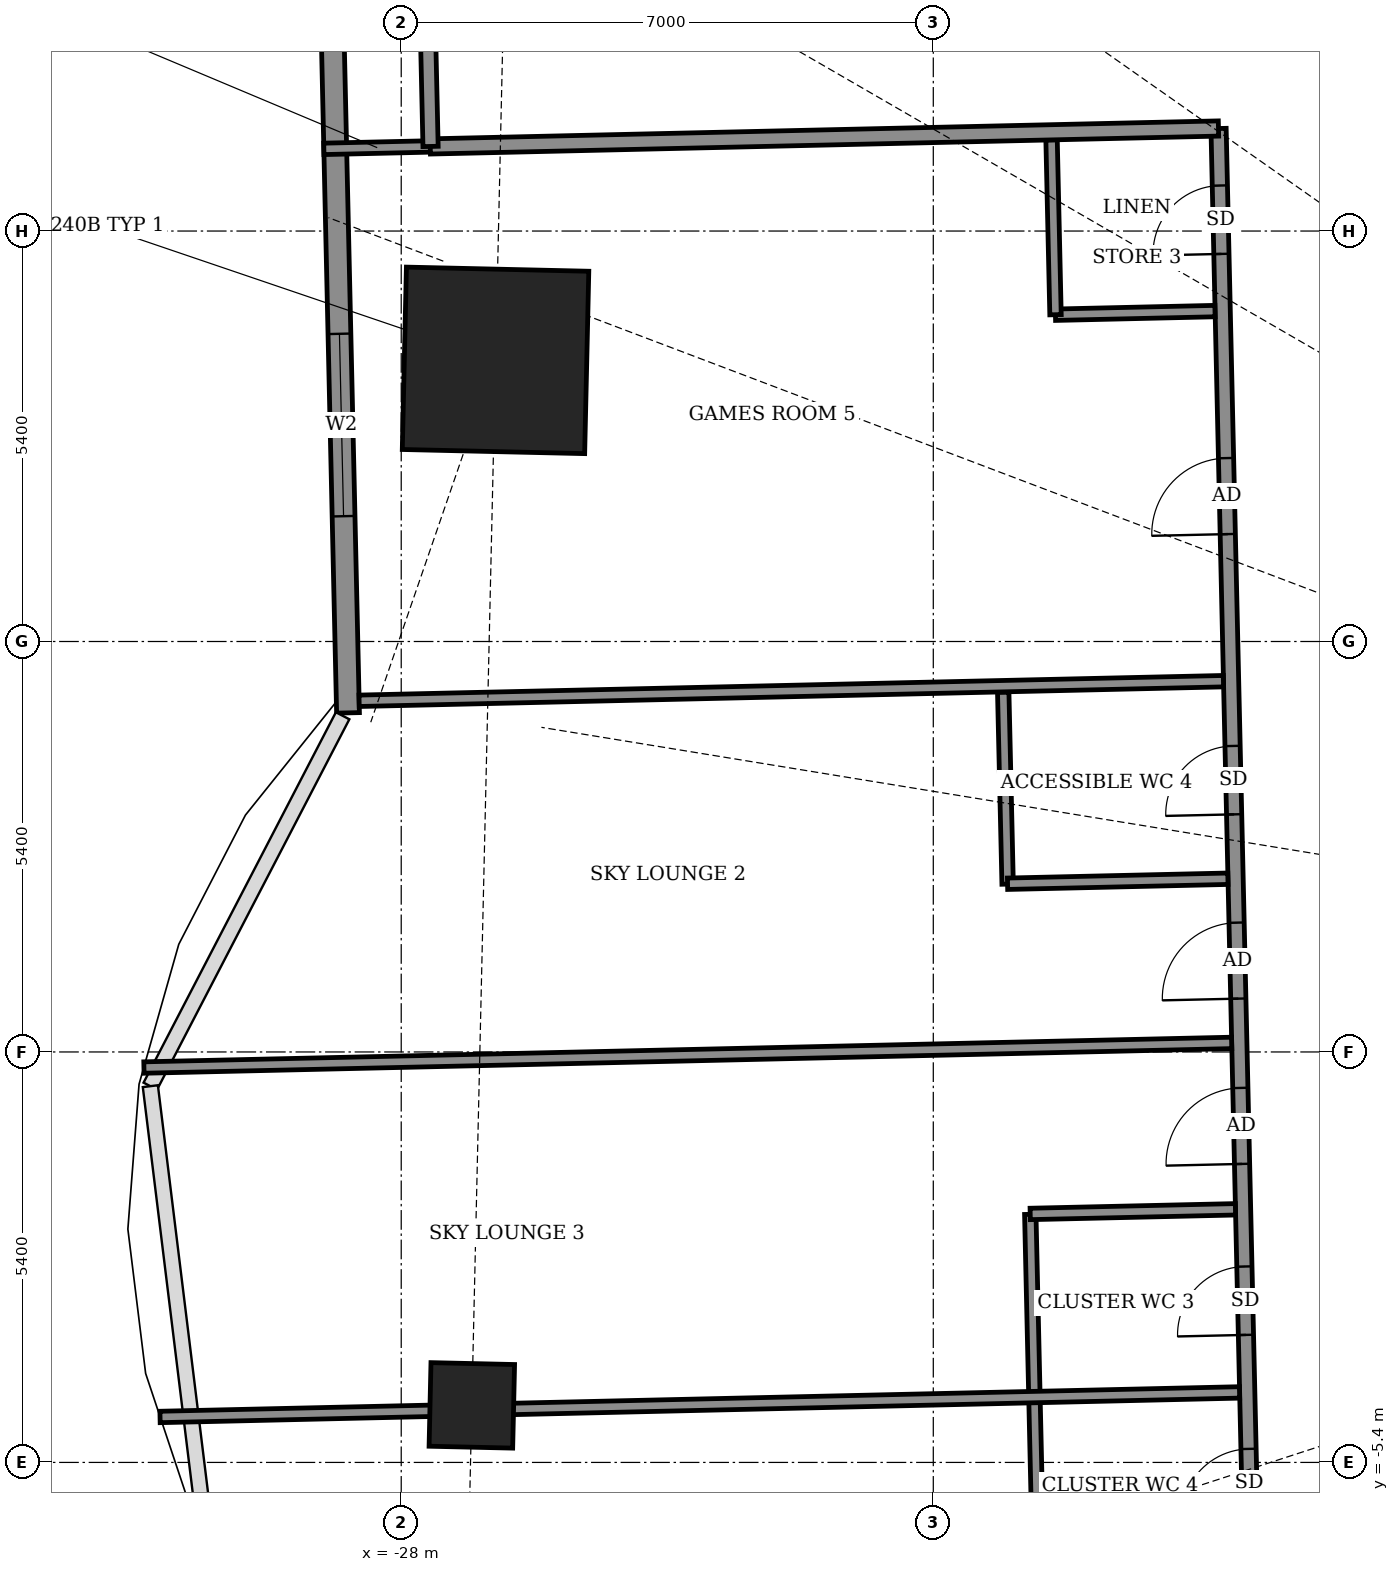
"""IFC4 building model, lengths in metres.
Left out: names, types, materials, properties, quantities, classifications, styles, units other than length and angle.
Written with IfcOpenShell. Run it as: python <this file> out.ifc"""

import sys

from ifc_helpers import new_model, si_unit, direction, frame, frame_2d, origin, origin_2d, place, context, subcontext, project, spatial, rectangle, extrude, element, fill, save


model = new_model("IFC4")
c1 = context("Model", 3, precision=1e-05, world=origin(), true_north=direction((0.0, 1.0)))
c2 = subcontext(c1, "Body", "Model", "MODEL_VIEW")
j1 = project(units=[si_unit("LENGTHUNIT", "METRE"), si_unit("PLANEANGLEUNIT", "RADIAN")], contexts=[c1])
p1 = place(None, origin())
s1 = spatial("IfcSite", under=j1, at=p1, CompositionType="ELEMENT")
p2 = place(p1, origin())
s2 = spatial("IfcBuilding", under=s1, at=p2, CompositionType="ELEMENT")
p3 = place(p2, frame((0.0, 0.0, 226.5)))
s3 = spatial("IfcBuildingStorey", under=s2, at=p3, CompositionType="ELEMENT", Elevation=226.5)
p4 = place(p3, frame((-27.071, -4.649, -0.55), z_axis=(0.0, 0.0, 1.0), x_axis=(-0.02268213383, -0.999742727308, 0.0)))
e1 = element("IfcColumn", 1, at=p4, inside=s3, PredefinedType="COLUMN", context=c2, shape_type="SweptSolid", body=[
    extrude(rectangle(XDim=1.1, YDim=1.1, at=origin_2d()), origin(), (0.0, 0.0, 1.0), 4.6),
])
p5 = place(p3, frame((-26.759, 9.099, -0.55), z_axis=(0.0, 0.0, 1.0), x_axis=(-0.022658386004, -0.999743265816, 0.0)))
e2 = element("IfcColumn", 2, at=p5, inside=s3, PredefinedType="COLUMN", context=c2, shape_type="SweptSolid", body=[
    extrude(rectangle(XDim=2.4, YDim=2.4, at=origin_2d()), origin(), (0.0, 0.0, 1.0), 4.6),
])
p6 = place(p3, frame((-28.979, 16.784, 0.0), z_axis=(0.0, 0.0, 1.0), x_axis=(0.022639069896, -0.999743703413, 0.0)))
e3 = element("IfcWall", 3, at=p6, inside=s3, PredefinedType="SOLIDWALL", context=c2, shape_type="SweptSolid", body=[
    extrude(rectangle(XDim=12.326, YDim=0.3, at=frame_2d((6.163, 0.0))), origin(), (0.0, 0.0, 1.0), 2.65),
])
p7 = place(p6, frame((1.625, 0.0, 0.0)))
e4 = element("IfcOpeningElement", 4, at=p7, cuts=e3, PredefinedType="OPENING", context=c2, shape_type="SweptSolid", body=[
    extrude(rectangle(XDim=1.5, YDim=2.4, at=frame_2d((0.75, 1.2))), frame((0.0, 0.16, 0.0), z_axis=(0.0, -1.0, 0.0), x_axis=(1.0, 0.0, 0.0)), (0.0, 0.0, 1.0), 0.32),
])
p8 = place(p6, frame((7.338, 0.0, 0.9)))
e5 = element("IfcOpeningElement", 5, at=p8, cuts=e3, PredefinedType="OPENING", context=c2, shape_type="SweptSolid", body=[
    extrude(rectangle(XDim=2.4, YDim=1.5, at=frame_2d((1.2, 0.75))), frame((0.0, 0.16, 0.0), z_axis=(0.0, -1.0, 0.0), x_axis=(1.0, 0.0, 0.0)), (0.0, 0.0, 1.0), 0.32),
])
p9 = place(p3, frame((-31.652, 12.672, 0.0), z_axis=(0.0, 0.0, 1.0), x_axis=(-0.022611811187, 0.999744320311, 0.0)))
e6 = element("IfcWall", 6, at=p9, inside=s3, PredefinedType="USERDEFINED", context=c2, shape_type="SweptSolid", body=[
    extrude(rectangle(XDim=4.2, YDim=0.55, at=frame_2d((2.1, 0.0))), origin(), (0.0, 0.0, 1.0), 0.8),
])
p10 = place(p3, frame((-16.678, -12.919, 0.0), z_axis=(0.0, 0.0, 1.0), x_axis=(-0.022696191528, 0.999742408268, 0.0)))
e7 = element("IfcWall", 7, at=p10, inside=s3, PredefinedType="PARTITIONING", context=c2, shape_type="SweptSolid", body=[
    extrude(rectangle(XDim=25.074, YDim=0.2, at=frame_2d((12.537, 0.0))), origin(), (0.0, 0.0, 1.0), 2.65),
])
p11 = place(p10, frame((19.737, 0.0, 0.0)))
e8 = element("IfcOpeningElement", 8, at=p11, cuts=e7, PredefinedType="OPENING", context=c2, shape_type="SweptSolid", body=[
    extrude(rectangle(XDim=1.0, YDim=2.1, at=frame_2d((0.5, 1.05))), frame((0.0, 0.11, 0.0), z_axis=(0.0, -1.0, 0.0), x_axis=(1.0, 0.0, 0.0)), (0.0, 0.0, 1.0), 0.22),
])
p12 = place(p10, frame((23.424, 0.0, 0.0)))
e9 = element("IfcOpeningElement", 9, at=p12, cuts=e7, PredefinedType="OPENING", context=c2, shape_type="SweptSolid", body=[
    extrude(rectangle(XDim=0.9, YDim=2.1, at=frame_2d((0.45, 1.05))), frame((0.0, 0.11, 0.0), z_axis=(0.0, -1.0, 0.0), x_axis=(1.0, 0.0, 0.0)), (0.0, 0.0, 1.0), 0.22),
])
p13 = place(p10, frame((13.624, 0.0, 0.0)))
e10 = element("IfcOpeningElement", 10, at=p13, cuts=e7, PredefinedType="OPENING", context=c2, shape_type="SweptSolid", body=[
    extrude(rectangle(XDim=1.0, YDim=2.1, at=frame_2d((0.5, 1.05))), frame((0.0, 0.11, 0.0), z_axis=(0.0, -1.0, 0.0), x_axis=(1.0, 0.0, 0.0)), (0.0, 0.0, 1.0), 0.22),
])
p14 = place(p10, frame((16.049, 0.0, 0.0)))
e11 = element("IfcOpeningElement", 11, at=p14, cuts=e7, PredefinedType="OPENING", context=c2, shape_type="SweptSolid", body=[
    extrude(rectangle(XDim=0.9, YDim=2.1, at=frame_2d((0.45, 1.05))), frame((0.0, 0.11, 0.0), z_axis=(0.0, -1.0, 0.0), x_axis=(1.0, 0.0, 0.0)), (0.0, 0.0, 1.0), 0.22),
])
p15 = place(p10, frame((11.449, 0.0, 0.0)))
e12 = element("IfcOpeningElement", 12, at=p15, cuts=e7, PredefinedType="OPENING", context=c2, shape_type="SweptSolid", body=[
    extrude(rectangle(XDim=1.0, YDim=2.1, at=frame_2d((0.5, 1.05))), frame((0.0, 0.11, 0.0), z_axis=(0.0, -1.0, 0.0), x_axis=(1.0, 0.0, 0.0)), (0.0, 0.0, 1.0), 0.22),
])
p16 = place(p10, frame((9.199, 0.0, 0.0)))
e13 = element("IfcOpeningElement", 13, at=p16, cuts=e7, PredefinedType="OPENING", context=c2, shape_type="SweptSolid", body=[
    extrude(rectangle(XDim=0.9, YDim=2.1, at=frame_2d((0.45, 1.05))), frame((0.0, 0.11, 0.0), z_axis=(0.0, -1.0, 0.0), x_axis=(1.0, 0.0, 0.0)), (0.0, 0.0, 1.0), 0.22),
])
p17 = place(p10, frame((4.549, 0.0, 0.0)))
e14 = element("IfcOpeningElement", 14, at=p17, cuts=e7, PredefinedType="OPENING", context=c2, shape_type="SweptSolid", body=[
    extrude(rectangle(XDim=1.0, YDim=2.1, at=frame_2d((0.5, 1.05))), frame((0.0, 0.11, 0.0), z_axis=(0.0, -1.0, 0.0), x_axis=(1.0, 0.0, 0.0)), (0.0, 0.0, 1.0), 0.22),
])
p18 = place(p10, frame((6.799, 0.0, 0.0)))
e15 = element("IfcOpeningElement", 15, at=p18, cuts=e7, PredefinedType="OPENING", context=c2, shape_type="SweptSolid", body=[
    extrude(rectangle(XDim=0.9, YDim=2.1, at=frame_2d((0.45, 1.05))), frame((0.0, 0.11, 0.0), z_axis=(0.0, -1.0, 0.0), x_axis=(1.0, 0.0, 0.0)), (0.0, 0.0, 1.0), 0.22),
])
p19 = place(p3, frame((-19.615, -6.935, 0.0), z_axis=(0.0, 0.0, 1.0), x_axis=(-0.022734113616, 0.99974154664, 0.0)))
e16 = element("IfcWall", 16, at=p19, inside=s3, PredefinedType="PARTITIONING", context=c2, shape_type="SweptSolid", body=[
    extrude(rectangle(XDim=4.8, YDim=0.15, at=frame_2d((2.4, 0.0))), origin(), (0.0, 0.0, 1.0), 2.75),
])
p20 = place(p3, frame((-31.173, -4.802, 0.0), z_axis=(0.0, 0.0, 1.0), x_axis=(0.999741480525, 0.022737020882, 0.0)))
e17 = element("IfcWall", 17, at=p20, inside=s3, PredefinedType="PARTITIONING", context=c2, shape_type="SweptSolid", body=[
    extrude(rectangle(XDim=14.206, YDim=0.15, at=frame_2d((7.103, 0.0))), origin(), (0.0, 0.0, 1.0), 0.93),
])
p21 = place(p3, frame((-19.725, -2.131, 0.0), z_axis=(0.0, 0.0, 1.0), x_axis=(0.999744627938, 0.022598205876, 0.0)))
e18 = element("IfcWall", 18, at=p21, inside=s3, PredefinedType="PARTITIONING", context=c2, shape_type="SweptSolid", body=[
    extrude(rectangle(XDim=2.701, YDim=0.15, at=frame_2d((1.351, 0.0))), origin(), (0.0, 0.0, 1.0), 4.05),
])
p22 = place(p3, frame((-31.385, -0.205, 0.0), z_axis=(0.0, 0.0, 1.0), x_axis=(0.99974382177, 0.022633842623, 0.0)))
e19 = element("IfcWall", 19, at=p22, inside=s3, PredefinedType="PARTITIONING", context=c2, shape_type="SweptSolid", body=[
    extrude(rectangle(XDim=14.314, YDim=0.15, at=frame_2d((7.157, 0.0))), origin(), (0.0, 0.0, 1.0), 0.93),
])
p23 = place(p3, frame((-20.022, 2.208, 0.0), z_axis=(0.0, 0.0, 1.0), x_axis=(-0.023015762656, 0.999735102249, 0.0)))
e20 = element("IfcWall", 20, at=p23, inside=s3, PredefinedType="PARTITIONING", context=c2, shape_type="SweptSolid", body=[
    extrude(rectangle(XDim=2.525, YDim=0.15, at=frame_2d((1.262, 0.0))), origin(), (0.0, 0.0, 1.0), 2.85),
])
p24 = place(p3, frame((-20.023, 2.213, 0.0), z_axis=(0.0, 0.0, 1.0), x_axis=(0.999739657619, 0.022817032779, 0.0)))
e21 = element("IfcWall", 21, at=p24, inside=s3, PredefinedType="PARTITIONING", context=c2, shape_type="SweptSolid", body=[
    extrude(rectangle(XDim=2.9, YDim=0.15, at=frame_2d((1.45, 0.0))), origin(), (0.0, 0.0, 1.0), 2.85),
])
p25 = place(p3, frame((-28.554, 4.62, 0.0), z_axis=(0.0, 0.0, 1.0), x_axis=(0.999743064147, 0.022667282356, 0.0)))
e22 = element("IfcWall", 22, at=p25, inside=s3, PredefinedType="PARTITIONING", context=c2, shape_type="SweptSolid", body=[
    extrude(rectangle(XDim=11.374, YDim=0.15, at=frame_2d((5.687, 0.0))), origin(), (0.0, 0.0, 1.0), 2.55),
])
p26 = place(p3, frame((-19.393, 9.699, 0.0), z_axis=(0.0, 0.0, 1.0), x_axis=(0.999737616439, 0.022906293375, 0.0)))
e23 = element("IfcWall", 23, at=p26, inside=s3, PredefinedType="PARTITIONING", context=c2, shape_type="SweptSolid", body=[
    extrude(rectangle(XDim=2.1, YDim=0.15, at=frame_2d((1.05, 0.0))), origin(), (0.0, 0.0, 1.0), 2.65),
])
p27 = place(p3, frame((-19.392, 9.699, 0.0), z_axis=(0.0, 0.0, 1.0), x_axis=(-0.022603288534, 0.999744513037, 0.0)))
e24 = element("IfcWall", 24, at=p27, inside=s3, PredefinedType="PARTITIONING", context=c2, shape_type="SweptSolid", body=[
    extrude(rectangle(XDim=2.301, YDim=0.15, at=frame_2d((1.15, 0.0))), origin(), (0.0, 0.0, 1.0), 2.65),
])
p28 = place(p3, frame((-29.018, 11.881, 0.0), z_axis=(0.0, 0.0, 1.0), x_axis=(0.999740667531, 0.022772739949, 0.0)))
e25 = element("IfcWall", 25, at=p28, inside=s3, PredefinedType="PARTITIONING", context=c2, shape_type="SweptSolid", body=[
    extrude(rectangle(XDim=1.404, YDim=0.15, at=frame_2d((0.702, 0.0))), origin(), (0.0, 0.0, 1.0), 4.05),
])
p29 = place(p3, frame((-27.618, 11.913, 0.0), z_axis=(0.0, 0.0, 1.0), x_axis=(0.999741483035, 0.022736910479, 0.0)))
e26 = element("IfcWall", 26, at=p29, inside=s3, PredefinedType="PARTITIONING", context=c2, shape_type="SweptSolid", body=[
    extrude(rectangle(XDim=10.373, YDim=0.2, at=frame_2d((5.186, 0.0))), origin(), (0.0, 0.0, 1.0), 2.55),
])
p30 = place(p3, frame((-27.614, 11.913, 0.0), z_axis=(0.0, 0.0, 1.0), x_axis=(-0.022617910375, 0.999744182344, 0.0)))
e27 = element("IfcWall", 27, at=p30, inside=s3, PredefinedType="PARTITIONING", context=c2, shape_type="SweptSolid", body=[
    extrude(rectangle(XDim=1.5, YDim=0.2, at=frame_2d((0.75, 0.0))), origin(), (0.0, 0.0, 1.0), 4.05),
])
p31 = place(p8, origin())
e28 = element("IfcWindow", 28, at=p31, inside=s3, PartitioningType="DOUBLE_PANEL_VERTICAL", PredefinedType="WINDOW", context=c2, shape_type="SweptSolid", body=[
    extrude(rectangle(XDim=2.4, YDim=1.5, at=frame_2d((1.2, 0.75))), frame((0.0, 0.03, 0.0), z_axis=(0.0, -1.0, 0.0), x_axis=(1.0, 0.0, 0.0)), (0.0, 0.0, 1.0), 0.06),
])
fill(e5, e28)
p32 = place(p11, origin())
e29 = element("IfcDoor", 29, at=p32, inside=s3, OperationType="SINGLE_SWING_RIGHT", PredefinedType="DOOR", context=c2, shape_type="SweptSolid", body=[
    extrude(rectangle(XDim=1.0, YDim=2.1, at=frame_2d((0.5, 1.05))), frame((0.0, 0.025, 0.0), z_axis=(0.0, -1.0, 0.0), x_axis=(1.0, 0.0, 0.0)), (0.0, 0.0, 1.0), 0.05),
])
fill(e8, e29)
p33 = place(p12, origin())
e30 = element("IfcDoor", 30, at=p33, inside=s3, OperationType="SINGLE_SWING_RIGHT", PredefinedType="DOOR", context=c2, shape_type="SweptSolid", body=[
    extrude(rectangle(XDim=0.9, YDim=2.1, at=frame_2d((0.45, 1.05))), frame((0.0, 0.025, 0.0), z_axis=(0.0, -1.0, 0.0), x_axis=(1.0, 0.0, 0.0)), (0.0, 0.0, 1.0), 0.05),
])
fill(e9, e30)
p34 = place(p13, origin())
e31 = element("IfcDoor", 31, at=p34, inside=s3, OperationType="SINGLE_SWING_LEFT", PredefinedType="DOOR", context=c2, shape_type="SweptSolid", body=[
    extrude(rectangle(XDim=1.0, YDim=2.1, at=frame_2d((0.5, 1.05))), frame((0.0, 0.025, 0.0), z_axis=(0.0, -1.0, 0.0), x_axis=(1.0, 0.0, 0.0)), (0.0, 0.0, 1.0), 0.05),
])
fill(e10, e31)
p35 = place(p14, origin())
e32 = element("IfcDoor", 32, at=p35, inside=s3, OperationType="SINGLE_SWING_LEFT", PredefinedType="DOOR", context=c2, shape_type="SweptSolid", body=[
    extrude(rectangle(XDim=0.9, YDim=2.1, at=frame_2d((0.45, 1.05))), frame((0.0, 0.025, 0.0), z_axis=(0.0, -1.0, 0.0), x_axis=(1.0, 0.0, 0.0)), (0.0, 0.0, 1.0), 0.05),
])
fill(e11, e32)
p36 = place(p15, origin())
e33 = element("IfcDoor", 33, at=p36, inside=s3, OperationType="SINGLE_SWING_RIGHT", PredefinedType="DOOR", context=c2, shape_type="SweptSolid", body=[
    extrude(rectangle(XDim=1.0, YDim=2.1, at=frame_2d((0.5, 1.05))), frame((0.0, 0.025, 0.0), z_axis=(0.0, -1.0, 0.0), x_axis=(1.0, 0.0, 0.0)), (0.0, 0.0, 1.0), 0.05),
])
fill(e12, e33)
p37 = place(p16, origin())
e34 = element("IfcDoor", 34, at=p37, inside=s3, OperationType="SINGLE_SWING_RIGHT", PredefinedType="DOOR", context=c2, shape_type="SweptSolid", body=[
    extrude(rectangle(XDim=0.9, YDim=2.1, at=frame_2d((0.45, 1.05))), frame((0.0, 0.025, 0.0), z_axis=(0.0, -1.0, 0.0), x_axis=(1.0, 0.0, 0.0)), (0.0, 0.0, 1.0), 0.05),
])
fill(e13, e34)
p38 = place(p18, origin())
e35 = element("IfcDoor", 35, at=p38, inside=s3, OperationType="SINGLE_SWING_LEFT", PredefinedType="DOOR", context=c2, shape_type="SweptSolid", body=[
    extrude(rectangle(XDim=0.9, YDim=2.1, at=frame_2d((0.45, 1.05))), frame((0.0, 0.025, 0.0), z_axis=(0.0, -1.0, 0.0), x_axis=(1.0, 0.0, 0.0)), (0.0, 0.0, 1.0), 0.05),
])
fill(e15, e35)
save(model, sys.argv[1])
